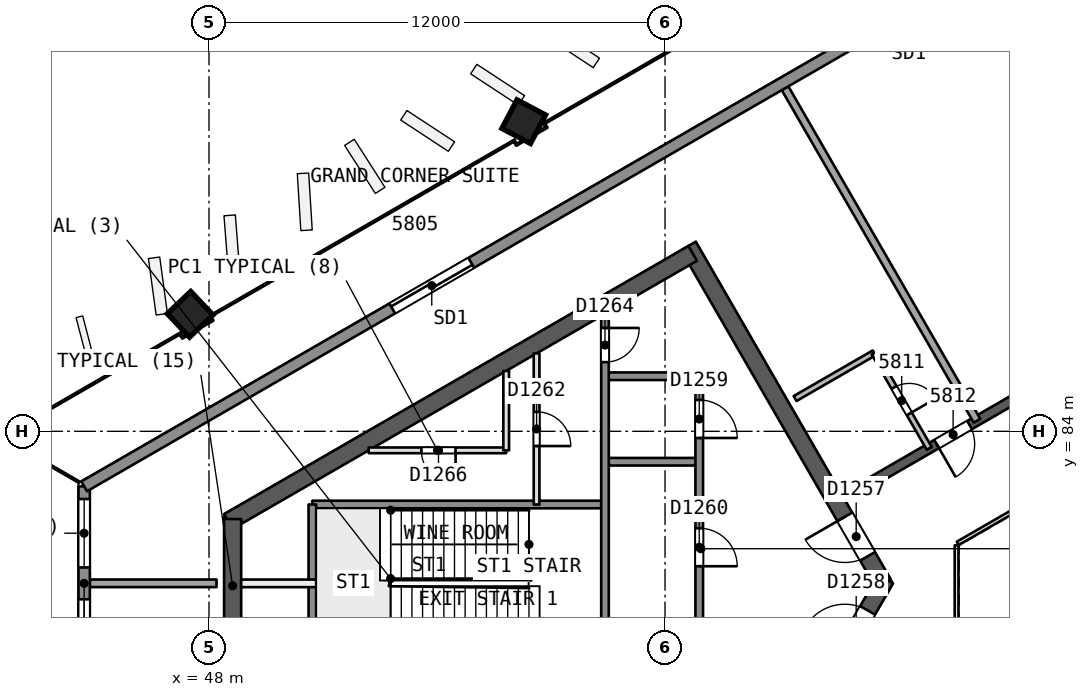
"""IFC4 building model, lengths in metres.
Left out: names, types, materials, properties, quantities, classifications, styles, units other than length and angle.
Written with IfcOpenShell. Run it as: python <this file> out.ifc"""

import sys

from ifc_helpers import new_model, si_unit, direction, frame, frame_2d, origin, origin_2d, place, context, subcontext, project, spatial, rectangle, extrude, element, fill, save


model = new_model("IFC4")
c1 = context("Model", 3, precision=1e-05, world=origin(), true_north=direction((0.0, 1.0)))
c2 = subcontext(c1, "Body", "Model", "MODEL_VIEW")
j1 = project(units=[si_unit("LENGTHUNIT", "METRE"), si_unit("PLANEANGLEUNIT", "RADIAN")], contexts=[c1])
p1 = place(None, origin())
s1 = spatial("IfcSite", under=j1, at=p1, CompositionType="ELEMENT")
p2 = place(p1, origin())
s2 = spatial("IfcBuilding", under=s1, at=p2, CompositionType="ELEMENT")
p3 = place(p2, frame((0.0, 0.0, 235.4)))
s3 = spatial("IfcBuildingStorey", under=s2, at=p3, CompositionType="ELEMENT", Elevation=235.4)
p4 = place(p3, frame((65.74, 80.0, 0.0), z_axis=(0.0, 0.0, 1.0), x_axis=(-0.499991857942, 0.866030104553, 0.0)))
e1 = element("IfcWall", 1, at=p4, inside=s3, PredefinedType="SHEAR", context=c2, shape_type="SweptSolid", body=[
    extrude(rectangle(XDim=10.25, YDim=0.45, at=frame_2d((5.125, 0.0))), origin(), (0.0, 0.0, 1.0), 3.7),
])
p5 = place(p4, frame((0.82, 0.0, 0.0)))
e2 = element("IfcOpeningElement", 2, at=p5, cuts=e1, PredefinedType="OPENING", context=c2, shape_type="SweptSolid", body=[
    extrude(rectangle(XDim=1.2, YDim=2.1, at=frame_2d((0.6, 1.05))), frame((0.0, 0.235, 0.0), z_axis=(0.0, -1.0, 0.0), x_axis=(1.0, 0.0, 0.0)), (0.0, 0.0, 1.0), 0.471),
])
p6 = place(p3, frame((60.728, 88.682, 0.0), z_axis=(0.0, 0.0, 1.0), x_axis=(-0.866021613849, -0.500006564303, 0.0)))
e3 = element("IfcWall", 3, at=p6, inside=s3, PredefinedType="SHEAR", context=c2, shape_type="SweptSolid", body=[
    extrude(rectangle(XDim=14.108, YDim=0.45, at=frame_2d((7.054, 0.0))), origin(), (0.0, 0.0, 1.0), 3.7),
])
p7 = place(p3, frame((48.622, 81.693, 0.0), z_axis=(0.0, 0.0, 1.0), x_axis=(0.0, -1.0, 0.0)))
e4 = element("IfcWall", 4, at=p7, inside=s3, PredefinedType="SHEAR", context=c2, shape_type="SweptSolid", body=[
    extrude(rectangle(XDim=3.515, YDim=0.45, at=frame_2d((1.758, 0.0))), origin(), (0.0, 0.0, 1.0), 3.7),
])
p8 = place(p3, frame((60.728, 71.318, 0.0), z_axis=(0.0, 0.0, 1.0), x_axis=(0.500012416173, 0.866018235185, 0.0)))
e5 = element("IfcWall", 5, at=p8, inside=s3, PredefinedType="SHEAR", context=c2, shape_type="SweptSolid", body=[
    extrude(rectangle(XDim=10.155, YDim=0.45, at=frame_2d((5.078, 0.0))), origin(), (0.0, 0.0, 1.0), 3.7),
])
p9 = place(p8, frame((8.005, 0.0, 0.0)))
e6 = element("IfcOpeningElement", 6, at=p9, cuts=e5, PredefinedType="OPENING", context=c2, shape_type="SweptSolid", body=[
    extrude(rectangle(XDim=1.2, YDim=2.1, at=frame_2d((0.6, 1.05))), frame((0.0, 0.235, 0.0), z_axis=(0.0, -1.0, 0.0), x_axis=(1.0, 0.0, 0.0)), (0.0, 0.0, 1.0), 0.471),
])
p10 = place(p3, frame((78.2, 90.046, 0.0), z_axis=(0.0, 0.0, 1.0), x_axis=(-0.866026492143, -0.499998114903, 0.0)))
e7 = element("IfcWall", 7, at=p10, inside=s3, PredefinedType="SHEAR", context=c2, shape_type="SweptSolid", body=[
    extrude(rectangle(XDim=15.588, YDim=0.25, at=frame_2d((7.794, 0.0))), origin(), (0.0, 0.0, 1.0), 3.3),
])
p11 = place(p10, frame((3.294, 0.0, 0.0)))
e8 = element("IfcOpeningElement", 8, at=p11, cuts=e7, PredefinedType="OPENING", context=c2, shape_type="SweptSolid", body=[
    extrude(rectangle(XDim=1.0, YDim=2.1, at=frame_2d((0.5, 1.05))), frame((0.0, 0.135, 0.0), z_axis=(0.0, -1.0, 0.0), x_axis=(1.0, 0.0, 0.0)), (0.0, 0.0, 1.0), 0.271),
])
p12 = place(p10, frame((9.162, 0.0, 0.0)))
e9 = element("IfcOpeningElement", 9, at=p12, cuts=e7, PredefinedType="OPENING", context=c2, shape_type="SweptSolid", body=[
    extrude(rectangle(XDim=1.1, YDim=2.1, at=frame_2d((0.55, 1.05))), frame((0.0, 0.135, 0.0), z_axis=(0.0, -1.0, 0.0), x_axis=(1.0, 0.0, 0.0)), (0.0, 0.0, 1.0), 0.271),
])
p13 = place(p10, frame((11.762, 0.0, 0.0)))
e10 = element("IfcOpeningElement", 10, at=p13, cuts=e7, PredefinedType="OPENING", context=c2, shape_type="SweptSolid", body=[
    extrude(rectangle(XDim=1.0, YDim=2.1, at=frame_2d((0.5, 1.05))), frame((0.0, 0.135, 0.0), z_axis=(0.0, -1.0, 0.0), x_axis=(1.0, 0.0, 0.0)), (0.0, 0.0, 1.0), 0.271),
])
p14 = place(p3, frame((56.259, 92.162, 0.0), z_axis=(0.019327242333, -0.012137244332, 0.999739538582), x_axis=(-0.500214328423, 0.865666448646, 0.020179824807)))
e11 = element("IfcColumn", 11, at=p14, inside=s3, PredefinedType="COLUMN", context=c2, shape_type="SweptSolid", body=[
    extrude(rectangle(XDim=0.85, YDim=0.85, at=origin_2d()), origin(), (0.0, 0.0, 1.0), 3.701),
])
p15 = place(p3, frame((47.469, 87.087, 0.0), z_axis=(0.028557232129, -0.006793059837, 0.999569076568), x_axis=(-0.500407681469, 0.865554719029, 0.0201787188)))
e12 = element("IfcColumn", 12, at=p15, inside=s3, PredefinedType="COLUMN", context=c2, shape_type="SweptSolid", body=[
    extrude(rectangle(XDim=0.85, YDim=0.85, at=origin_2d()), origin(), (0.0, 0.0, 1.0), 3.702),
])
for number, where, z_axis, x_axis in (
    (13, (68.828, 96.302, 0.0), (0.0, 0.0, 1.0), (0.5, -0.866, 0.0)),
    (14, (63.158, 93.029, 0.0), (0.0, 0.0, 1.0), (0.5, -0.866, 0.0)),
):
    element("IfcWall", number, at=place(p3, frame(where, z_axis=z_axis, x_axis=x_axis)), inside=s3, PredefinedType="PARTITIONING", context=c2, shape_type="SweptSolid", body=[
        extrude(rectangle(XDim=10.104, YDim=0.2, at=frame_2d((5.052, 0.0))), origin(), (0.0, 0.0, 1.0), 3.3),
    ])
p16 = place(p3, frame((63.422, 84.863, 0.0), z_axis=(0.0, 0.0, 1.0), x_axis=(0.865994240961, 0.500053971709, 0.0)))
e15 = element("IfcWall", 15, at=p16, inside=s3, PredefinedType="PARTITIONING", context=c2, shape_type="SweptSolid", body=[
    extrude(rectangle(XDim=2.401, YDim=0.15, at=frame_2d((1.201, 0.0))), origin(), (0.0, 0.0, 1.0), 3.3),
])
p17 = place(p3, frame((65.502, 86.063, 0.0), z_axis=(0.0, 0.0, 1.0), x_axis=(0.499987231761, -0.866032775405, 0.0)))
e16 = element("IfcWall", 16, at=p17, inside=s3, PredefinedType="PARTITIONING", context=c2, shape_type="SweptSolid", body=[
    extrude(rectangle(XDim=2.9, YDim=0.15, at=frame_2d((1.45, 0.0))), origin(), (0.0, 0.0, 1.0), 3.3),
])
p18 = place(p17, frame((1.05, 0.0, 0.0)))
e17 = element("IfcOpeningElement", 17, at=p18, cuts=e16, PredefinedType="OPENING", context=c2, shape_type="SweptSolid", body=[
    extrude(rectangle(XDim=0.8, YDim=2.1, at=frame_2d((0.4, 1.05))), frame((0.0, 0.085, 0.0), z_axis=(0.0, -1.0, 0.0), x_axis=(1.0, 0.0, 0.0)), (0.0, 0.0, 1.0), 0.171),
])
p19 = place(p3, frame((44.864, 80.001, 0.0), z_axis=(0.0, 0.0, 1.0), x_axis=(1.0, 0.0, 0.0)))
e18 = element("IfcWall", 18, at=p19, inside=s3, PredefinedType="PARTITIONING", context=c2, shape_type="SweptSolid", body=[
    extrude(rectangle(XDim=3.334, YDim=0.2, at=frame_2d((1.667, 0.0))), origin(), (0.0, 0.0, 1.0), 3.3),
])
p20 = place(p3, frame((44.715, 77.448, 0.0), z_axis=(0.0, 0.0, 1.0), x_axis=(0.0, 1.0, 0.0)))
e19 = element("IfcWall", 19, at=p20, inside=s3, PredefinedType="SOLIDWALL", context=c2, shape_type="SweptSolid", body=[
    extrude(rectangle(XDim=5.105, YDim=0.3, at=frame_2d((2.552, 0.0))), origin(), (0.0, 0.0, 1.0), 3.3),
])
p21 = place(p20, frame((2.972, 0.0, 0.9)))
e20 = element("IfcOpeningElement", 20, at=p21, cuts=e19, PredefinedType="OPENING", context=c2, shape_type="SweptSolid", body=[
    extrude(rectangle(XDim=1.8, YDim=1.5, at=frame_2d((0.9, 0.75))), frame((0.0, 0.161, 0.0), z_axis=(0.0, -1.0, 0.0), x_axis=(1.0, 0.0, 0.0)), (0.0, 0.0, 1.0), 0.321),
])
p22 = place(p20, frame((0.333, 0.0, 0.9)))
e21 = element("IfcOpeningElement", 21, at=p22, cuts=e19, PredefinedType="OPENING", context=c2, shape_type="SweptSolid", body=[
    extrude(rectangle(XDim=1.8, YDim=1.5, at=frame_2d((0.9, 0.75))), frame((0.0, 0.161, 0.0), z_axis=(0.0, -1.0, 0.0), x_axis=(1.0, 0.0, 0.0)), (0.0, 0.0, 1.0), 0.321),
])
p23 = place(p3, frame((44.715, 82.552, 0.0), z_axis=(0.0, 0.0, 1.0), x_axis=(0.866025334516, 0.500000119977, 0.0)))
e22 = element("IfcWall", 22, at=p23, inside=s3, PredefinedType="SOLIDWALL", context=c2, shape_type="SweptSolid", body=[
    extrude(rectangle(XDim=49.903, YDim=0.3, at=frame_2d((24.952, 0.0))), origin(), (0.0, 0.0, 1.0), 3.3),
])
p24 = place(p23, frame((23.284, 0.0, 0.0)))
e23 = element("IfcOpeningElement", 23, at=p24, cuts=e22, PredefinedType="OPENING", context=c2, shape_type="SweptSolid", body=[
    extrude(rectangle(XDim=2.4, YDim=2.4, at=frame_2d((1.2, 1.2))), frame((0.0, 0.161, 0.0), z_axis=(0.0, -1.0, 0.0), x_axis=(1.0, 0.0, 0.0)), (0.0, 0.0, 1.0), 0.321),
])
p25 = place(p23, frame((37.674, 0.0, 0.0)))
e24 = element("IfcOpeningElement", 24, at=p25, cuts=e22, PredefinedType="OPENING", context=c2, shape_type="SweptSolid", body=[
    extrude(rectangle(XDim=2.4, YDim=2.4, at=frame_2d((1.2, 1.2))), frame((0.0, 0.161, 0.0), z_axis=(0.0, -1.0, 0.0), x_axis=(1.0, 0.0, 0.0)), (0.0, 0.0, 1.0), 0.321),
])
p26 = place(p23, frame((9.362, 0.0, 0.0)))
e25 = element("IfcOpeningElement", 25, at=p26, cuts=e22, PredefinedType="OPENING", context=c2, shape_type="SweptSolid", body=[
    extrude(rectangle(XDim=2.4, YDim=2.4, at=frame_2d((1.2, 1.2))), frame((0.0, 0.161, 0.0), z_axis=(0.0, -1.0, 0.0), x_axis=(1.0, 0.0, 0.0)), (0.0, 0.0, 1.0), 0.321),
])
p27 = place(p3, frame((60.9, 85.45, 0.0), z_axis=(0.0, 0.0, 1.0), x_axis=(-1.0, 0.0, 0.0)))
e26 = element("IfcWall", 26, at=p27, inside=s3, PredefinedType="SOLIDWALL", context=c2, shape_type="SweptSolid", body=[
    extrude(rectangle(XDim=2.48, YDim=0.2, at=frame_2d((1.24, 0.0))), origin(), (0.0, 0.0, 1.0), 3.3),
])
p28 = place(p3, frame((55.82, 83.5, 0.0), z_axis=(0.0, 0.0, 1.0), x_axis=(-1.0, 0.0, 0.0)))
e27 = element("IfcWall", 27, at=p28, inside=s3, PredefinedType="PARTITIONING", context=c2, shape_type="SweptSolid", body=[
    extrude(rectangle(XDim=3.618, YDim=0.15, at=frame_2d((1.809, 0.0))), origin(), (0.0, 0.0, 1.0), 3.3),
])
p29 = place(p28, frame((1.332, 0.0, 0.0)))
e28 = element("IfcOpeningElement", 28, at=p29, cuts=e27, PredefinedType="OPENING", context=c2, shape_type="SweptSolid", body=[
    extrude(rectangle(XDim=0.9, YDim=2.1, at=frame_2d((0.45, 1.05))), frame((0.0, 0.085, 0.0), z_axis=(0.0, -1.0, 0.0), x_axis=(1.0, 0.0, 0.0)), (0.0, 0.0, 1.0), 0.171),
])
p30 = place(p3, frame((60.9, 83.2, 0.0), z_axis=(0.0, 0.0, 1.0), x_axis=(-1.0, 0.0, 0.0)))
e29 = element("IfcWall", 29, at=p30, inside=s3, PredefinedType="SOLIDWALL", context=c2, shape_type="SweptSolid", body=[
    extrude(rectangle(XDim=2.48, YDim=0.2, at=frame_2d((1.24, 0.0))), origin(), (0.0, 0.0, 1.0), 3.3),
])
p31 = place(p3, frame((58.42, 82.075, 0.0), z_axis=(0.0, 0.0, 1.0), x_axis=(-1.0, 0.0, 0.0)))
e30 = element("IfcWall", 30, at=p31, inside=s3, PredefinedType="SOLIDWALL", context=c2, shape_type="SweptSolid", body=[
    extrude(rectangle(XDim=7.7, YDim=0.2, at=frame_2d((3.85, 0.0))), origin(), (0.0, 0.0, 1.0), 3.3),
])
p32 = place(p3, frame((50.82, 80.0, 0.0), z_axis=(0.0, 0.0, 1.0), x_axis=(-1.0, 0.0, 0.0)))
e31 = element("IfcWall", 31, at=p32, inside=s3, PredefinedType="PARTITIONING", context=c2, shape_type="SweptSolid", body=[
    extrude(rectangle(XDim=1.973, YDim=0.2, at=frame_2d((0.987, 0.0))), origin(), (0.0, 0.0, 1.0), 3.3),
])
p33 = place(p3, frame((60.9, 85.45, 0.0), z_axis=(0.0, 0.0, 1.0), x_axis=(0.0, -1.0, 0.0)))
e32 = element("IfcWall", 32, at=p33, inside=s3, PredefinedType="SOLIDWALL", context=c2, shape_type="SweptSolid", body=[
    extrude(rectangle(XDim=10.9, YDim=0.2, at=frame_2d((5.45, 0.0))), origin(), (0.0, 0.0, 1.0), 3.3),
])
p34 = place(p33, frame((0.625, 0.0, 0.0)))
e33 = element("IfcOpeningElement", 33, at=p34, cuts=e32, PredefinedType="OPENING", context=c2, shape_type="SweptSolid", body=[
    extrude(rectangle(XDim=1.0, YDim=2.1, at=frame_2d((0.5, 1.05))), frame((0.0, 0.11, 0.0), z_axis=(0.0, -1.0, 0.0), x_axis=(1.0, 0.0, 0.0)), (0.0, 0.0, 1.0), 0.221),
])
p35 = place(p33, frame((4.0, 0.0, 0.0)))
e34 = element("IfcOpeningElement", 34, at=p35, cuts=e32, PredefinedType="OPENING", context=c2, shape_type="SweptSolid", body=[
    extrude(rectangle(XDim=1.0, YDim=2.1, at=frame_2d((0.5, 1.05))), frame((0.0, 0.11, 0.0), z_axis=(0.0, -1.0, 0.0), x_axis=(1.0, 0.0, 0.0)), (0.0, 0.0, 1.0), 0.221),
])
p36 = place(p33, frame((7.375, 0.0, 0.0)))
e35 = element("IfcOpeningElement", 35, at=p36, cuts=e32, PredefinedType="OPENING", context=c2, shape_type="SweptSolid", body=[
    extrude(rectangle(XDim=1.0, YDim=2.1, at=frame_2d((0.5, 1.05))), frame((0.0, 0.11, 0.0), z_axis=(0.0, -1.0, 0.0), x_axis=(1.0, 0.0, 0.0)), (0.0, 0.0, 1.0), 0.221),
])
p37 = place(p3, frame((58.42, 87.09, 0.0), z_axis=(0.0, 0.0, 1.0), x_axis=(0.0, -1.0, 0.0)))
e36 = element("IfcWall", 36, at=p37, inside=s3, PredefinedType="SOLIDWALL", context=c2, shape_type="SweptSolid", body=[
    extrude(rectangle(XDim=10.64, YDim=0.2, at=frame_2d((5.32, 0.0))), origin(), (0.0, 0.0, 1.0), 3.3),
])
p38 = place(p37, frame((0.37, 0.0, 0.0)))
e37 = element("IfcOpeningElement", 37, at=p38, cuts=e36, PredefinedType="OPENING", context=c2, shape_type="SweptSolid", body=[
    extrude(rectangle(XDim=0.9, YDim=2.1, at=frame_2d((0.45, 1.05))), frame((0.0, 0.11, 0.0), z_axis=(0.0, -1.0, 0.0), x_axis=(1.0, 0.0, 0.0)), (0.0, 0.0, 1.0), 0.221),
])
p39 = place(p3, frame((56.62, 86.051, 0.0), z_axis=(0.0, 0.0, 1.0), x_axis=(0.0, -1.0, 0.0)))
e38 = element("IfcWall", 38, at=p39, inside=s3, PredefinedType="PARTITIONING", context=c2, shape_type="SweptSolid", body=[
    extrude(rectangle(XDim=3.976, YDim=0.15, at=frame_2d((1.988, 0.0))), origin(), (0.0, 0.0, 1.0), 3.3),
])
p40 = place(p39, frame((1.538, 0.0, 0.0)))
e39 = element("IfcOpeningElement", 39, at=p40, cuts=e38, PredefinedType="OPENING", context=c2, shape_type="SweptSolid", body=[
    extrude(rectangle(XDim=0.9, YDim=2.1, at=frame_2d((0.45, 1.05))), frame((0.0, 0.085, 0.0), z_axis=(0.0, -1.0, 0.0), x_axis=(1.0, 0.0, 0.0)), (0.0, 0.0, 1.0), 0.171),
])
p41 = place(p3, frame((55.82, 85.589, 0.0), z_axis=(0.0, 0.0, 1.0), x_axis=(0.0, -1.0, 0.0)))
e40 = element("IfcWall", 40, at=p41, inside=s3, PredefinedType="PARTITIONING", context=c2, shape_type="SweptSolid", body=[
    extrude(rectangle(XDim=2.089, YDim=0.15, at=frame_2d((1.044, 0.0))), origin(), (0.0, 0.0, 1.0), 3.3),
])
p42 = place(p3, frame((50.72, 82.075, 0.0), z_axis=(0.0, 0.0, 1.0), x_axis=(0.0, -1.0, 0.0)))
e41 = element("IfcWall", 41, at=p42, inside=s3, PredefinedType="SOLIDWALL", context=c2, shape_type="SweptSolid", body=[
    extrude(rectangle(XDim=4.15, YDim=0.2, at=frame_2d((2.075, 0.0))), origin(), (0.0, 0.0, 1.0), 3.3),
])
p43 = place(p3, frame((77.738, 86.846, 0.0), z_axis=(0.0, 0.0, 1.0), x_axis=(-0.866026658274, -0.499997827154, 0.0)))
e42 = element("IfcWall", 42, at=p43, inside=s3, PredefinedType="PARTITIONING", context=c2, shape_type="SweptSolid", body=[
    extrude(rectangle(XDim=11.588, YDim=0.1, at=frame_2d((5.794, 0.0))), origin(), (0.0, 0.0, 1.0), 3.3),
])
p44 = place(p3, frame((67.672, 81.0, 0.0), z_axis=(0.0, 0.0, 1.0), x_axis=(0.0, -1.0, 0.0)))
e43 = element("IfcWall", 43, at=p44, inside=s3, PredefinedType="PARTITIONING", context=c2, shape_type="SweptSolid", body=[
    extrude(rectangle(XDim=2.0, YDim=0.1, at=frame_2d((1.0, 0.0))), origin(), (0.0, 0.0, 1.0), 3.3),
])
p45 = place(p18, origin())
e44 = element("IfcDoor", 44, at=p45, inside=s3, OperationType="SINGLE_SWING_RIGHT", PredefinedType="NOTDEFINED", context=c2, shape_type="SweptSolid", body=[
    extrude(rectangle(XDim=0.8, YDim=2.1, at=frame_2d((0.4, 1.05))), frame((0.0, 0.025, 0.0), z_axis=(0.0, -1.0, 0.0), x_axis=(1.0, 0.0, 0.0)), (0.0, 0.0, 1.0), 0.05),
])
fill(e17, e44)
p46 = place(p13, origin())
e45 = element("IfcDoor", 45, at=p46, inside=s3, OperationType="SINGLE_SWING_RIGHT", PredefinedType="NOTDEFINED", context=c2, shape_type="SweptSolid", body=[
    extrude(rectangle(XDim=1.0, YDim=2.1, at=frame_2d((0.5, 1.05))), frame((0.0, 0.025, 0.0), z_axis=(0.0, -1.0, 0.0), x_axis=(1.0, 0.0, 0.0)), (0.0, 0.0, 1.0), 0.05),
])
fill(e10, e45)
p47 = place(p21, origin())
e46 = element("IfcWindow", 46, at=p47, inside=s3, PartitioningType="SINGLE_PANEL", PredefinedType="WINDOW", context=c2, shape_type="SweptSolid", body=[
    extrude(rectangle(XDim=1.8, YDim=1.5, at=frame_2d((0.9, 0.75))), frame((0.0, 0.03, 0.0), z_axis=(0.0, -1.0, 0.0), x_axis=(1.0, 0.0, 0.0)), (0.0, 0.0, 1.0), 0.06),
])
fill(e20, e46)
p48 = place(p22, origin())
e47 = element("IfcWindow", 47, at=p48, inside=s3, PartitioningType="SINGLE_PANEL", PredefinedType="WINDOW", context=c2, shape_type="SweptSolid", body=[
    extrude(rectangle(XDim=1.8, YDim=1.5, at=frame_2d((0.9, 0.75))), frame((0.0, 0.03, 0.0), z_axis=(0.0, -1.0, 0.0), x_axis=(1.0, 0.0, 0.0)), (0.0, 0.0, 1.0), 0.06),
])
fill(e21, e47)
p49 = place(p26, origin())
e48 = element("IfcDoor", 48, at=p49, inside=s3, OperationType="SLIDING_TO_LEFT", PredefinedType="NOTDEFINED", context=c2, shape_type="SweptSolid", body=[
    extrude(rectangle(XDim=2.4, YDim=2.4, at=frame_2d((1.2, 1.2))), frame((0.0, 0.025, 0.0), z_axis=(0.0, -1.0, 0.0), x_axis=(1.0, 0.0, 0.0)), (0.0, 0.0, 1.0), 0.05),
])
fill(e25, e48)
p50 = place(p5, origin())
e49 = element("IfcDoor", 49, at=p50, inside=s3, OperationType="SINGLE_SWING_RIGHT", PredefinedType="NOTDEFINED", context=c2, shape_type="SweptSolid", body=[
    extrude(rectangle(XDim=1.2, YDim=2.1, at=frame_2d((0.6, 1.05))), frame((0.0, 0.025, 0.0), z_axis=(0.0, -1.0, 0.0), x_axis=(1.0, 0.0, 0.0)), (0.0, 0.0, 1.0), 0.05),
])
fill(e2, e49)
p51 = place(p9, origin())
e50 = element("IfcDoor", 50, at=p51, inside=s3, OperationType="SINGLE_SWING_LEFT", PredefinedType="NOTDEFINED", context=c2, shape_type="SweptSolid", body=[
    extrude(rectangle(XDim=1.2, YDim=2.1, at=frame_2d((0.6, 1.05))), frame((0.0, 0.025, 0.0), z_axis=(0.0, -1.0, 0.0), x_axis=(1.0, 0.0, 0.0)), (0.0, 0.0, 1.0), 0.05),
])
fill(e6, e50)
p52 = place(p34, origin())
e51 = element("IfcDoor", 51, at=p52, inside=s3, OperationType="SINGLE_SWING_RIGHT", PredefinedType="NOTDEFINED", context=c2, shape_type="SweptSolid", body=[
    extrude(rectangle(XDim=1.0, YDim=2.1, at=frame_2d((0.5, 1.05))), frame((0.0, 0.025, 0.0), z_axis=(0.0, -1.0, 0.0), x_axis=(1.0, 0.0, 0.0)), (0.0, 0.0, 1.0), 0.05),
])
fill(e33, e51)
p53 = place(p35, origin())
e52 = element("IfcDoor", 52, at=p53, inside=s3, OperationType="SINGLE_SWING_RIGHT", PredefinedType="NOTDEFINED", context=c2, shape_type="SweptSolid", body=[
    extrude(rectangle(XDim=1.0, YDim=2.1, at=frame_2d((0.5, 1.05))), frame((0.0, 0.025, 0.0), z_axis=(0.0, -1.0, 0.0), x_axis=(1.0, 0.0, 0.0)), (0.0, 0.0, 1.0), 0.05),
])
fill(e34, e52)
p54 = place(p40, origin())
e53 = element("IfcDoor", 53, at=p54, inside=s3, OperationType="SINGLE_SWING_RIGHT", PredefinedType="NOTDEFINED", context=c2, shape_type="SweptSolid", body=[
    extrude(rectangle(XDim=0.9, YDim=2.1, at=frame_2d((0.45, 1.05))), frame((0.0, 0.025, 0.0), z_axis=(0.0, -1.0, 0.0), x_axis=(1.0, 0.0, 0.0)), (0.0, 0.0, 1.0), 0.05),
])
fill(e39, e53)
p55 = place(p38, origin())
e54 = element("IfcDoor", 54, at=p55, inside=s3, OperationType="SINGLE_SWING_LEFT", PredefinedType="NOTDEFINED", context=c2, shape_type="SweptSolid", body=[
    extrude(rectangle(XDim=0.9, YDim=2.1, at=frame_2d((0.45, 1.05))), frame((0.0, 0.025, 0.0), z_axis=(0.0, -1.0, 0.0), x_axis=(1.0, 0.0, 0.0)), (0.0, 0.0, 1.0), 0.05),
])
fill(e37, e54)
p56 = place(p29, origin())
e55 = element("IfcDoor", 55, at=p56, inside=s3, OperationType="SINGLE_SWING_LEFT", PredefinedType="NOTDEFINED", context=c2, shape_type="SweptSolid", body=[
    extrude(rectangle(XDim=0.9, YDim=2.1, at=frame_2d((0.45, 1.05))), frame((0.0, 0.025, 0.0), z_axis=(0.0, -1.0, 0.0), x_axis=(1.0, 0.0, 0.0)), (0.0, 0.0, 1.0), 0.05),
])
fill(e28, e55)
save(model, sys.argv[1])
